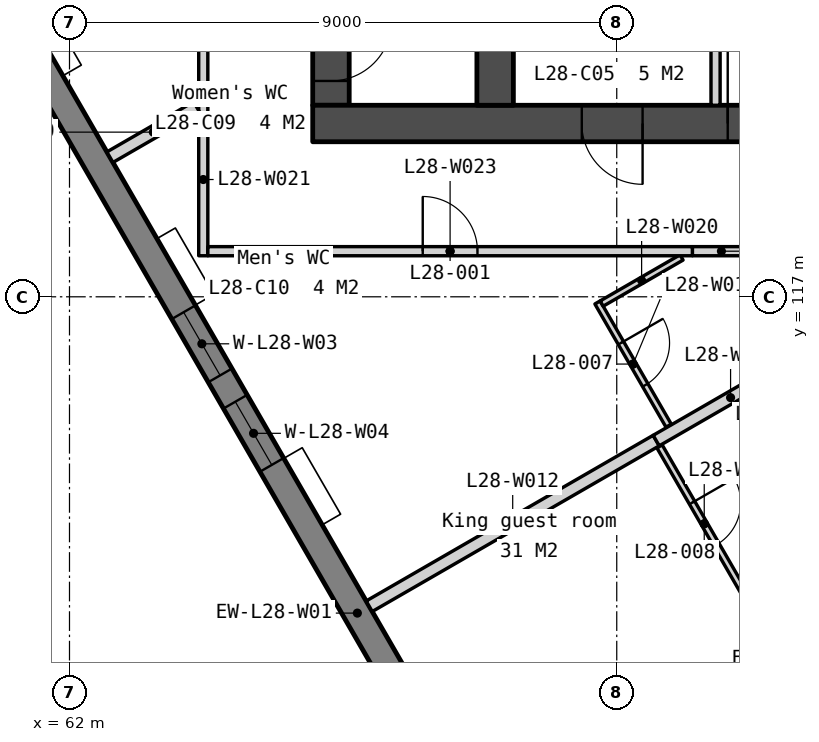
"""IFC4 building model, lengths in metres.
Left out: names, types, materials, properties, quantities, classifications, styles, units other than length and angle.
Written with IfcOpenShell. Run it as: python <this file> out.ifc"""

import sys

from ifc_helpers import new_model, si_unit, direction, frame, frame_2d, origin, place, context, subcontext, project, spatial, polyline, rectangle, outline, extrude, element, fill, save


model = new_model("IFC4")
c1 = context("Model", 3, precision=1e-05, world=origin(), true_north=direction((0.0, 1.0)))
c2 = subcontext(c1, "Body", "Model", "MODEL_VIEW")
j1 = project(units=[si_unit("LENGTHUNIT", "METRE"), si_unit("PLANEANGLEUNIT", "RADIAN")], contexts=[c1])
p1 = place(None, origin())
s1 = spatial("IfcSite", under=j1, at=p1, CompositionType="ELEMENT")
p2 = place(p1, origin())
s2 = spatial("IfcBuilding", under=s1, at=p2, CompositionType="ELEMENT")
p3 = place(p2, frame((0.0, 0.0, 113.3)))
s3 = spatial("IfcBuildingStorey", under=s2, at=p3, CompositionType="ELEMENT", Elevation=113.3)
p4 = place(p3, frame((66.3, 133.95, 0.0), z_axis=(0.0, 0.0, 1.0), x_axis=(0.0, -1.0, 0.0)))
e1 = element("IfcWall", 1, at=p4, inside=s3, PredefinedType="SOLIDWALL", context=c2, shape_type="SweptSolid", body=[
    extrude(rectangle(XDim=13.8, YDim=0.6, at=frame_2d((6.9, 0.0))), origin(), (0.0, 0.0, 1.0), 3.35),
])
p5 = place(p4, frame((0.6, 0.0, 0.0)))
e2 = element("IfcOpeningElement", 2, at=p5, cuts=e1, PredefinedType="OPENING", context=c2, shape_type="SweptSolid", body=[
    extrude(rectangle(XDim=1.1, YDim=2.1, at=frame_2d((0.55, 1.05))), frame((0.0, 0.31, 0.0), z_axis=(0.0, -1.0, 0.0), x_axis=(1.0, 0.0, 0.0)), (0.0, 0.0, 1.0), 0.62),
])
p6 = place(p4, frame((8.405, 0.0, 0.0)))
e3 = element("IfcOpeningElement", 3, at=p6, cuts=e1, PredefinedType="OPENING", context=c2, shape_type="SweptSolid", body=[
    extrude(rectangle(XDim=1.0, YDim=2.1, at=frame_2d((0.5, 1.05))), frame((0.0, 0.31, 0.0), z_axis=(0.0, -1.0, 0.0), x_axis=(1.0, 0.0, 0.0)), (0.0, 0.0, 1.0), 0.62),
])
p7 = place(p4, frame((10.355, 0.0, 0.0)))
e4 = element("IfcOpeningElement", 4, at=p7, cuts=e1, PredefinedType="OPENING", context=c2, shape_type="SweptSolid", body=[
    extrude(rectangle(XDim=1.0, YDim=2.1, at=frame_2d((0.5, 1.05))), frame((0.0, 0.31, 0.0), z_axis=(0.0, -1.0, 0.0), x_axis=(1.0, 0.0, 0.0)), (0.0, 0.0, 1.0), 0.62),
])
p8 = place(p4, frame((12.4, 0.0, 0.0)))
e5 = element("IfcOpeningElement", 5, at=p8, cuts=e1, PredefinedType="OPENING", context=c2, shape_type="SweptSolid", body=[
    extrude(rectangle(XDim=1.0, YDim=2.1, at=frame_2d((0.5, 1.05))), frame((0.0, 0.31, 0.0), z_axis=(0.0, -1.0, 0.0), x_axis=(1.0, 0.0, 0.0)), (0.0, 0.0, 1.0), 0.62),
])
p9 = place(p3, frame((66.0, 119.85, 0.0), z_axis=(0.0, 0.0, 1.0), x_axis=(1.0, 0.0, 0.0)))
e6 = element("IfcWall", 6, at=p9, inside=s3, PredefinedType="SOLIDWALL", context=c2, shape_type="SweptSolid", body=[
    extrude(rectangle(XDim=28.0, YDim=0.6, at=frame_2d((14.0, 0.0))), origin(), (0.0, 0.0, 1.0), 3.35),
])
p10 = place(p9, frame((6.825, 0.0, 0.0)))
e7 = element("IfcOpeningElement", 7, at=p10, cuts=e6, PredefinedType="OPENING", context=c2, shape_type="SweptSolid", body=[
    extrude(rectangle(XDim=1.8, YDim=2.1, at=frame_2d((0.9, 1.05))), frame((0.0, 0.31, 0.0), z_axis=(0.0, -1.0, 0.0), x_axis=(1.0, 0.0, 0.0)), (0.0, 0.0, 1.0), 0.62),
])
p11 = place(p9, frame((15.85, 0.0, 0.0)))
e8 = element("IfcOpeningElement", 8, at=p11, cuts=e6, PredefinedType="OPENING", context=c2, shape_type="SweptSolid", body=[
    extrude(rectangle(XDim=1.5, YDim=2.1, at=frame_2d((0.75, 1.05))), frame((0.0, 0.31, 0.0), z_axis=(0.0, -1.0, 0.0), x_axis=(1.0, 0.0, 0.0)), (0.0, 0.0, 1.0), 0.62),
])
p12 = place(p9, frame((19.375, 0.0, 0.0)))
e9 = element("IfcOpeningElement", 9, at=p12, cuts=e6, PredefinedType="OPENING", context=c2, shape_type="SweptSolid", body=[
    extrude(rectangle(XDim=1.8, YDim=2.1, at=frame_2d((0.9, 1.05))), frame((0.0, 0.31, 0.0), z_axis=(0.0, -1.0, 0.0), x_axis=(1.0, 0.0, 0.0)), (0.0, 0.0, 1.0), 0.62),
])
p13 = place(p9, frame((4.425, 0.0, 0.0)))
e10 = element("IfcOpeningElement", 10, at=p13, cuts=e6, PredefinedType="OPENING", context=c2, shape_type="SweptSolid", body=[
    extrude(rectangle(XDim=1.0, YDim=2.1, at=frame_2d((0.5, 1.05))), frame((0.0, 0.31, 0.0), z_axis=(0.0, -1.0, 0.0), x_axis=(1.0, 0.0, 0.0)), (0.0, 0.0, 1.0), 0.62),
])
p14 = place(p9, frame((9.783, 0.0, 0.0)))
e11 = element("IfcOpeningElement", 11, at=p14, cuts=e6, PredefinedType="OPENING", context=c2, shape_type="SweptSolid", body=[
    extrude(rectangle(XDim=1.0, YDim=2.1, at=frame_2d((0.5, 1.05))), frame((0.0, 0.31, 0.0), z_axis=(0.0, -1.0, 0.0), x_axis=(1.0, 0.0, 0.0)), (0.0, 0.0, 1.0), 0.62),
])
p15 = place(p9, frame((11.525, 0.0, 0.0)))
e12 = element("IfcOpeningElement", 12, at=p15, cuts=e6, PredefinedType="OPENING", context=c2, shape_type="SweptSolid", body=[
    extrude(rectangle(XDim=1.0, YDim=2.1, at=frame_2d((0.5, 1.05))), frame((0.0, 0.31, 0.0), z_axis=(0.0, -1.0, 0.0), x_axis=(1.0, 0.0, 0.0)), (0.0, 0.0, 1.0), 0.62),
])
p16 = place(p9, frame((13.658, 0.0, 0.0)))
e13 = element("IfcOpeningElement", 13, at=p16, cuts=e6, PredefinedType="OPENING", context=c2, shape_type="SweptSolid", body=[
    extrude(rectangle(XDim=1.0, YDim=2.1, at=frame_2d((0.5, 1.05))), frame((0.0, 0.31, 0.0), z_axis=(0.0, -1.0, 0.0), x_axis=(1.0, 0.0, 0.0)), (0.0, 0.0, 1.0), 0.62),
])
p17 = place(p9, frame((21.725, 0.0, 0.0)))
e14 = element("IfcOpeningElement", 14, at=p17, cuts=e6, PredefinedType="OPENING", context=c2, shape_type="SweptSolid", body=[
    extrude(rectangle(XDim=1.0, YDim=2.1, at=frame_2d((0.5, 1.05))), frame((0.0, 0.31, 0.0), z_axis=(0.0, -1.0, 0.0), x_axis=(1.0, 0.0, 0.0)), (0.0, 0.0, 1.0), 0.62),
])
p18 = place(p9, frame((23.425, 0.0, 0.0)))
e15 = element("IfcOpeningElement", 15, at=p18, cuts=e6, PredefinedType="OPENING", context=c2, shape_type="SweptSolid", body=[
    extrude(rectangle(XDim=1.0, YDim=2.1, at=frame_2d((0.5, 1.05))), frame((0.0, 0.31, 0.0), z_axis=(0.0, -1.0, 0.0), x_axis=(1.0, 0.0, 0.0)), (0.0, 0.0, 1.0), 0.62),
])
p19 = place(p3, frame((69.0, 122.25, 0.0), z_axis=(0.0, 0.0, 1.0), x_axis=(0.0, -1.0, 0.0)))
e16 = element("IfcWall", 16, at=p19, inside=s3, PredefinedType="SOLIDWALL", context=c2, shape_type="SweptSolid", body=[
    extrude(rectangle(XDim=2.1, YDim=0.6, at=frame_2d((1.05, 0.0))), origin(), (0.0, 0.0, 1.0), 3.35),
])
p20 = place(p3, frame((72.625, 122.25, 0.0), z_axis=(0.0, 0.0, 1.0), x_axis=(0.0, -1.0, 0.0)))
e17 = element("IfcWall", 17, at=p20, inside=s3, PredefinedType="PARTITIONING", context=c2, shape_type="SweptSolid", body=[
    extrude(rectangle(XDim=2.1, YDim=0.15, at=frame_2d((1.05, 0.0))), origin(), (0.0, 0.0, 1.0), 3.35),
])
p21 = place(p3, frame((56.073, 130.263, -0.15), z_axis=(0.0, 0.0, 1.0), x_axis=(0.500000478905, -0.866025127289, 0.0)))
e18 = element("IfcWall", 18, at=p21, inside=s3, PredefinedType="SOLIDWALL", context=c2, shape_type="SweptSolid", body=[
    extrude(outline(polyline([(42.643, 0.0), (42.643, 3.5), (0.0, 3.5), (0.0, 0.0), (42.643, 0.0)])), frame((0.0, 0.225, 0.0), z_axis=(0.0, -1.0, 0.0), x_axis=(1.0, 0.0, 0.0)), (0.0, 0.0, 1.0), 0.45),
])
p22 = place(p21, frame((7.079, 0.0, 1.05)))
e19 = element("IfcOpeningElement", 19, at=p22, cuts=e18, PredefinedType="OPENING", context=c2, shape_type="SweptSolid", body=[
    extrude(rectangle(XDim=1.2, YDim=1.5, at=frame_2d((0.6, 0.75))), frame((0.0, 0.235, 0.0), z_axis=(0.0, -1.0, 0.0), x_axis=(1.0, 0.0, 0.0)), (0.0, 0.0, 1.0), 0.47),
])
p23 = place(p21, frame((8.779, 0.0, 1.05)))
e20 = element("IfcOpeningElement", 20, at=p23, cuts=e18, PredefinedType="OPENING", context=c2, shape_type="SweptSolid", body=[
    extrude(rectangle(XDim=1.2, YDim=1.5, at=frame_2d((0.6, 0.75))), frame((0.0, 0.235, 0.0), z_axis=(0.0, -1.0, 0.0), x_axis=(1.0, 0.0, 0.0)), (0.0, 0.0, 1.0), 0.47),
])
p24 = place(p21, frame((15.607, 0.0, 1.05)))
e21 = element("IfcOpeningElement", 21, at=p24, cuts=e18, PredefinedType="OPENING", context=c2, shape_type="SweptSolid", body=[
    extrude(rectangle(XDim=1.2, YDim=1.5, at=frame_2d((0.6, 0.75))), frame((0.0, 0.235, 0.0), z_axis=(0.0, -1.0, 0.0), x_axis=(1.0, 0.0, 0.0)), (0.0, 0.0, 1.0), 0.47),
])
p25 = place(p21, frame((17.307, 0.0, 1.05)))
e22 = element("IfcOpeningElement", 22, at=p25, cuts=e18, PredefinedType="OPENING", context=c2, shape_type="SweptSolid", body=[
    extrude(rectangle(XDim=1.2, YDim=1.5, at=frame_2d((0.6, 0.75))), frame((0.0, 0.235, 0.0), z_axis=(0.0, -1.0, 0.0), x_axis=(1.0, 0.0, 0.0)), (0.0, 0.0, 1.0), 0.47),
])
p26 = place(p21, frame((24.136, 0.0, 1.05)))
e23 = element("IfcOpeningElement", 23, at=p26, cuts=e18, PredefinedType="OPENING", context=c2, shape_type="SweptSolid", body=[
    extrude(rectangle(XDim=1.2, YDim=1.5, at=frame_2d((0.6, 0.75))), frame((0.0, 0.235, 0.0), z_axis=(0.0, -1.0, 0.0), x_axis=(1.0, 0.0, 0.0)), (0.0, 0.0, 1.0), 0.47),
])
p27 = place(p21, frame((25.836, 0.0, 1.05)))
e24 = element("IfcOpeningElement", 24, at=p27, cuts=e18, PredefinedType="OPENING", context=c2, shape_type="SweptSolid", body=[
    extrude(rectangle(XDim=1.2, YDim=1.5, at=frame_2d((0.6, 0.75))), frame((0.0, 0.235, 0.0), z_axis=(0.0, -1.0, 0.0), x_axis=(1.0, 0.0, 0.0)), (0.0, 0.0, 1.0), 0.47),
])
p28 = place(p21, frame((32.665, 0.0, 1.05)))
e25 = element("IfcOpeningElement", 25, at=p28, cuts=e18, PredefinedType="OPENING", context=c2, shape_type="SweptSolid", body=[
    extrude(rectangle(XDim=1.2, YDim=1.5, at=frame_2d((0.6, 0.75))), frame((0.0, 0.235, 0.0), z_axis=(0.0, -1.0, 0.0), x_axis=(1.0, 0.0, 0.0)), (0.0, 0.0, 1.0), 0.47),
])
p29 = place(p21, frame((34.365, 0.0, 1.05)))
e26 = element("IfcOpeningElement", 26, at=p29, cuts=e18, PredefinedType="OPENING", context=c2, shape_type="SweptSolid", body=[
    extrude(rectangle(XDim=1.2, YDim=1.5, at=frame_2d((0.6, 0.75))), frame((0.0, 0.235, 0.0), z_axis=(0.0, -1.0, 0.0), x_axis=(1.0, 0.0, 0.0)), (0.0, 0.0, 1.0), 0.47),
])
p30 = place(p3, frame((66.929, 111.91, 0.0), z_axis=(0.0, 0.0, 1.0), x_axis=(0.866012511928, 0.500022328685, 0.0)))
e27 = element("IfcWall", 27, at=p30, inside=s3, PredefinedType="PARTITIONING", context=c2, shape_type="SweptSolid", body=[
    extrude(rectangle(XDim=5.45, YDim=0.2, at=frame_2d((2.725, 0.0))), origin(), (0.0, 0.0, 1.0), 3.35),
])
p31 = place(p3, frame((71.704, 114.54, 0.0), z_axis=(0.0, 0.0, 1.0), x_axis=(0.499988418424, -0.866032090307, 0.0)))
e28 = element("IfcWall", 28, at=p31, inside=s3, PredefinedType="PARTITIONING", context=c2, shape_type="SweptSolid", body=[
    extrude(rectangle(XDim=2.94, YDim=0.1, at=frame_2d((1.47, 0.0))), origin(), (0.0, 0.0, 1.0), 3.35),
])
p32 = place(p31, frame((1.07, 0.0, 0.0)))
e29 = element("IfcOpeningElement", 29, at=p32, cuts=e28, PredefinedType="OPENING", context=c2, shape_type="SweptSolid", body=[
    extrude(rectangle(XDim=0.8, YDim=2.1, at=frame_2d((0.4, 1.05))), frame((0.0, 0.06, 0.0), z_axis=(0.0, -1.0, 0.0), x_axis=(1.0, 0.0, 0.0)), (0.0, 0.0, 1.0), 0.12),
])
p33 = place(p3, frame((71.649, 114.635, 0.0), z_axis=(0.0, 0.0, 1.0), x_axis=(0.866011447264, 0.500024172624, 0.0)))
e30 = element("IfcWall", 30, at=p33, inside=s3, PredefinedType="PARTITIONING", context=c2, shape_type="SweptSolid", body=[
    extrude(rectangle(XDim=2.825, YDim=0.2, at=frame_2d((1.413, 0.0))), origin(), (0.0, 0.0, 1.0), 3.35),
])
p34 = place(p3, frame((70.684, 116.907, 0.0), z_axis=(0.0, 0.0, 1.0), x_axis=(0.499999433879, -0.866025730634, 0.0)))
e31 = element("IfcWall", 31, at=p34, inside=s3, PredefinedType="PARTITIONING", context=c2, shape_type="SweptSolid", body=[
    extrude(rectangle(XDim=2.34, YDim=0.1, at=frame_2d((1.17, 0.0))), origin(), (0.0, 0.0, 1.0), 3.35),
])
p35 = place(p34, frame((0.77, 0.0, 0.0)))
e32 = element("IfcOpeningElement", 32, at=p35, cuts=e31, PredefinedType="OPENING", context=c2, shape_type="SweptSolid", body=[
    extrude(rectangle(XDim=0.8, YDim=2.1, at=frame_2d((0.4, 1.05))), frame((0.0, 0.06, 0.0), z_axis=(0.0, -1.0, 0.0), x_axis=(1.0, 0.0, 0.0)), (0.0, 0.0, 1.0), 0.12),
])
p36 = place(p3, frame((70.752, 116.889, 0.0), z_axis=(0.0, 0.0, 1.0), x_axis=(0.866016800201, 0.500014901547, 0.0)))
e33 = element("IfcWall", 33, at=p36, inside=s3, PredefinedType="PARTITIONING", context=c2, shape_type="SweptSolid", body=[
    extrude(rectangle(XDim=1.518, YDim=0.1, at=frame_2d((0.759, 0.0))), origin(), (0.0, 0.0, 1.0), 3.35),
])
p37 = place(p3, frame((64.2, 117.675, 0.0), z_axis=(0.0, 0.0, 1.0), x_axis=(0.0, 1.0, 0.0)))
e34 = element("IfcWall", 34, at=p37, inside=s3, PredefinedType="PARTITIONING", context=c2, shape_type="SweptSolid", body=[
    extrude(rectangle(XDim=2.508, YDim=0.15, at=frame_2d((1.254, 0.0))), origin(), (0.0, 0.0, 1.0), 3.35),
])
p38 = place(p3, frame((72.244, 117.75, 0.0), z_axis=(0.0, 0.0, 1.0), x_axis=(1.0, 0.0, 0.0)))
e35 = element("IfcWall", 35, at=p38, inside=s3, PredefinedType="PARTITIONING", context=c2, shape_type="SweptSolid", body=[
    extrude(rectangle(XDim=0.956, YDim=0.15, at=frame_2d((0.478, 0.0))), origin(), (0.0, 0.0, 1.0), 3.35),
])
p39 = place(p3, frame((64.275, 117.75, 0.0), z_axis=(0.0, 0.0, 1.0), x_axis=(1.0, 0.0, 0.0)))
e36 = element("IfcWall", 36, at=p39, inside=s3, PredefinedType="PARTITIONING", context=c2, shape_type="SweptSolid", body=[
    extrude(rectangle(XDim=7.969, YDim=0.15, at=frame_2d((3.984, 0.0))), origin(), (0.0, 0.0, 1.0), 3.35),
])
p40 = place(p39, frame((3.534, 0.0, 0.0)))
e37 = element("IfcOpeningElement", 37, at=p40, cuts=e36, PredefinedType="OPENING", context=c2, shape_type="SweptSolid", body=[
    extrude(rectangle(XDim=0.9, YDim=2.1, at=frame_2d((0.45, 1.05))), frame((0.0, 0.085, 0.0), z_axis=(0.0, -1.0, 0.0), x_axis=(1.0, 0.0, 0.0)), (0.0, 0.0, 1.0), 0.17),
])
p41 = place(p3, frame((62.665, 119.296, 0.0), z_axis=(0.0, 0.0, 1.0), x_axis=(0.866101713734, 0.499867803992, 0.0)))
e38 = element("IfcWall", 38, at=p41, inside=s3, PredefinedType="PARTITIONING", context=c2, shape_type="SweptSolid", body=[
    extrude(rectangle(XDim=1.648, YDim=0.2, at=frame_2d((0.824, 0.0))), origin(), (0.0, 0.0, 1.0), 3.35),
])
p42 = place(p3, frame((64.2, 120.183, 0.0), z_axis=(0.0, 0.0, 1.0), x_axis=(0.0, 1.0, 0.0)))
e39 = element("IfcWall", 39, at=p42, inside=s3, PredefinedType="PARTITIONING", context=c2, shape_type="SweptSolid", body=[
    extrude(rectangle(XDim=6.392, YDim=0.15, at=frame_2d((3.196, 0.0))), origin(), (0.0, 0.0, 1.0), 3.35),
])
p43 = place(p10, origin())
e40 = element("IfcDoor", 40, at=p43, inside=s3, OperationType="DOUBLE_DOOR_DOUBLE_SWING", PredefinedType="DOOR", context=c2, shape_type="SweptSolid", body=[
    extrude(rectangle(XDim=1.8, YDim=2.1, at=frame_2d((0.9, 1.05))), frame((0.0, 0.025, 0.0), z_axis=(0.0, -1.0, 0.0), x_axis=(1.0, 0.0, 0.0)), (0.0, 0.0, 1.0), 0.05),
])
fill(e7, e40)
p44 = place(p13, origin())
e41 = element("IfcDoor", 41, at=p44, inside=s3, OperationType="SINGLE_SWING_RIGHT", PredefinedType="DOOR", context=c2, shape_type="SweptSolid", body=[
    extrude(rectangle(XDim=1.0, YDim=2.1, at=frame_2d((0.5, 1.05))), frame((0.0, 0.025, 0.0), z_axis=(0.0, -1.0, 0.0), x_axis=(1.0, 0.0, 0.0)), (0.0, 0.0, 1.0), 0.05),
])
fill(e10, e41)
p45 = place(p8, origin())
e42 = element("IfcDoor", 42, at=p45, inside=s3, OperationType="SINGLE_SWING_LEFT", PredefinedType="DOOR", context=c2, shape_type="SweptSolid", body=[
    extrude(rectangle(XDim=1.0, YDim=2.1, at=frame_2d((0.5, 1.05))), frame((0.0, 0.025, 0.0), z_axis=(0.0, -1.0, 0.0), x_axis=(1.0, 0.0, 0.0)), (0.0, 0.0, 1.0), 0.05),
])
fill(e5, e42)
p46 = place(p24, origin())
e43 = element("IfcWindow", 43, at=p46, inside=s3, PartitioningType="SINGLE_PANEL", PredefinedType="WINDOW", context=c2, shape_type="SweptSolid", body=[
    extrude(rectangle(XDim=1.2, YDim=1.5, at=frame_2d((0.6, 0.75))), frame((0.0, 0.03, 0.0), z_axis=(0.0, -1.0, 0.0), x_axis=(1.0, 0.0, 0.0)), (0.0, 0.0, 1.0), 0.06),
])
fill(e21, e43)
p47 = place(p25, origin())
e44 = element("IfcWindow", 44, at=p47, inside=s3, PartitioningType="SINGLE_PANEL", PredefinedType="WINDOW", context=c2, shape_type="SweptSolid", body=[
    extrude(rectangle(XDim=1.2, YDim=1.5, at=frame_2d((0.6, 0.75))), frame((0.0, 0.03, 0.0), z_axis=(0.0, -1.0, 0.0), x_axis=(1.0, 0.0, 0.0)), (0.0, 0.0, 1.0), 0.06),
])
fill(e22, e44)
p48 = place(p40, origin())
e45 = element("IfcDoor", 45, at=p48, inside=s3, OperationType="SINGLE_SWING_LEFT", PredefinedType="DOOR", context=c2, shape_type="SweptSolid", body=[
    extrude(rectangle(XDim=0.9, YDim=2.1, at=frame_2d((0.45, 1.05))), frame((0.0, 0.025, 0.0), z_axis=(0.0, -1.0, 0.0), x_axis=(1.0, 0.0, 0.0)), (0.0, 0.0, 1.0), 0.05),
])
fill(e37, e45)
p49 = place(p35, origin())
e46 = element("IfcDoor", 46, at=p49, inside=s3, OperationType="SINGLE_SWING_LEFT", PredefinedType="DOOR", context=c2, shape_type="SweptSolid", body=[
    extrude(rectangle(XDim=0.8, YDim=2.1, at=frame_2d((0.4, 1.05))), frame((0.0, 0.025, 0.0), z_axis=(0.0, -1.0, 0.0), x_axis=(1.0, 0.0, 0.0)), (0.0, 0.0, 1.0), 0.05),
])
fill(e32, e46)
p50 = place(p32, origin())
e47 = element("IfcDoor", 47, at=p50, inside=s3, OperationType="SINGLE_SWING_LEFT", PredefinedType="DOOR", context=c2, shape_type="SweptSolid", body=[
    extrude(rectangle(XDim=0.8, YDim=2.1, at=frame_2d((0.4, 1.05))), frame((0.0, 0.025, 0.0), z_axis=(0.0, -1.0, 0.0), x_axis=(1.0, 0.0, 0.0)), (0.0, 0.0, 1.0), 0.05),
])
fill(e29, e47)
save(model, sys.argv[1])
